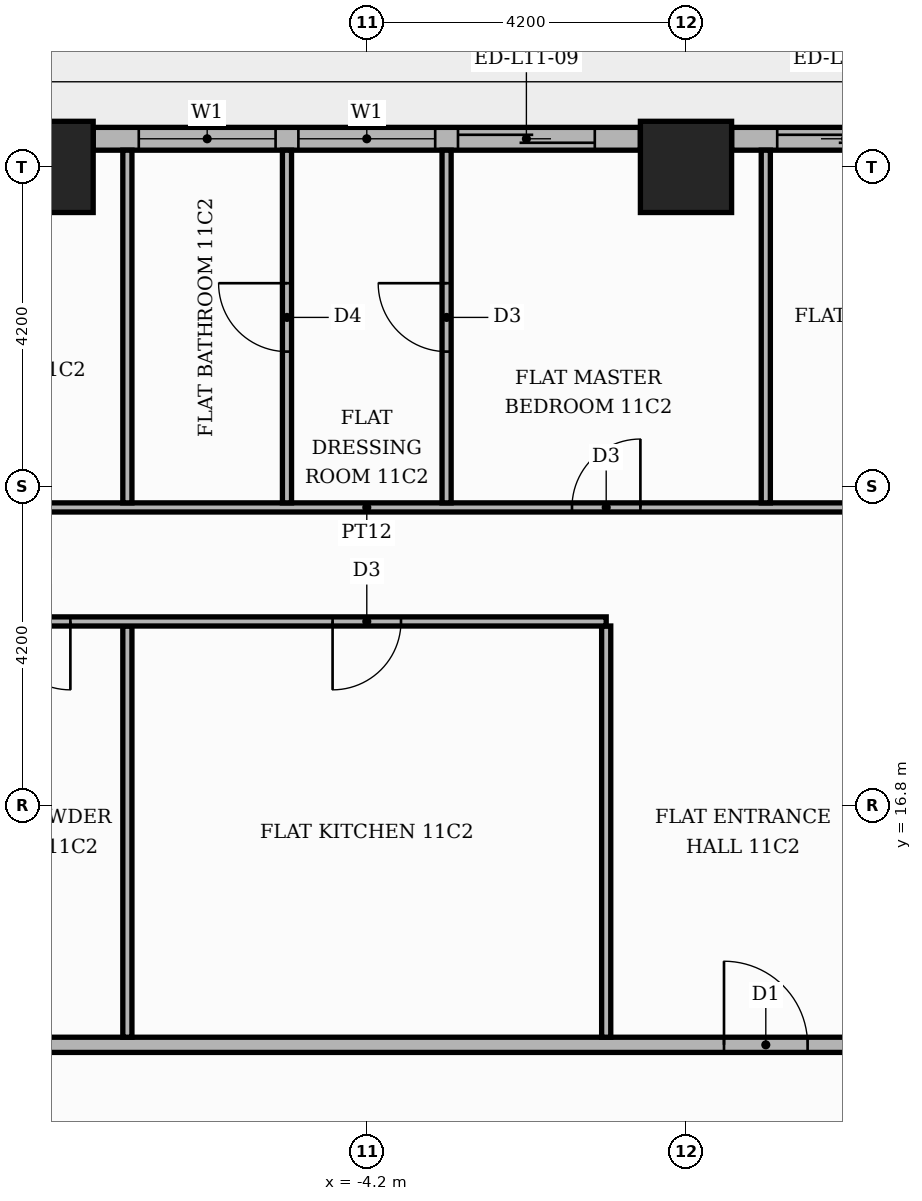
"""IFC4 building model, lengths in metres.
Left out: names, types, materials, properties, quantities, classifications, styles, units other than length and angle.
Written with IfcOpenShell. Run it as: python <this file> out.ifc"""

import sys

from ifc_helpers import new_model, si_unit, direction, frame, frame_2d, origin, origin_2d, place, context, subcontext, project, spatial, rectangle, extrude, element, fill, save


model = new_model("IFC4")
c1 = context("Model", 3, precision=1e-05, world=origin(), true_north=direction((0.0, 1.0)))
c2 = subcontext(c1, "Body", "Model", "MODEL_VIEW")
j1 = project(units=[si_unit("LENGTHUNIT", "METRE"), si_unit("PLANEANGLEUNIT", "RADIAN")], contexts=[c1])
p1 = place(None, origin())
s1 = spatial("IfcSite", under=j1, at=p1, CompositionType="ELEMENT")
p2 = place(p1, origin())
s2 = spatial("IfcBuilding", under=s1, at=p2, CompositionType="ELEMENT")
p3 = place(p2, frame((0.0, 0.0, 50.4)))
s3 = spatial("IfcBuildingStorey", under=s2, at=p3, CompositionType="ELEMENT", Elevation=50.4)
for number, where, z_axis, x_axis in (
    (1, (0.0, 25.2, 0.0), (0.0, 0.0, 1.0), (1.0, 0.0, 0.0)),
    (2, (-8.4, 25.2, 0.0), (0.0, 0.0, 1.0), (1.0, 0.0, 0.0)),
):
    element("IfcColumn", number, at=place(p3, frame(where, z_axis=z_axis, x_axis=x_axis)), inside=s3, PredefinedType="COLUMN", context=c2, shape_type="SweptSolid", body=[
        extrude(rectangle(XDim=1.2, YDim=1.2, at=origin_2d()), origin(), (0.0, 0.0, 1.0), 3.9),
    ])
p4 = place(p3, frame((7.8, 25.57, 0.0), z_axis=(0.0, 0.0, 1.0), x_axis=(-1.0, 0.0, 0.0)))
e3 = element("IfcWall", 3, at=p4, inside=s3, PredefinedType="STANDARD", context=c2, shape_type="SweptSolid", body=[
    extrude(rectangle(XDim=7.2, YDim=0.3, at=frame_2d((3.6, 0.0))), origin(), (0.0, 0.0, 1.0), 3.48),
])
p5 = place(p4, frame((0.6, 0.0, 0.9)))
e4 = element("IfcOpeningElement", 4, at=p5, cuts=e3, PredefinedType="OPENING", context=c2, shape_type="SweptSolid", body=[
    extrude(rectangle(XDim=1.8, YDim=2.1, at=frame_2d((0.9, 1.05))), frame((0.0, 0.16, 0.0), z_axis=(0.0, -1.0, 0.0), x_axis=(1.0, 0.0, 0.0)), (0.0, 0.0, 1.0), 0.32),
])
p6 = place(p4, frame((2.7, 0.0, 0.9)))
e5 = element("IfcOpeningElement", 5, at=p6, cuts=e3, PredefinedType="OPENING", context=c2, shape_type="SweptSolid", body=[
    extrude(rectangle(XDim=1.8, YDim=2.1, at=frame_2d((0.9, 1.05))), frame((0.0, 0.16, 0.0), z_axis=(0.0, -1.0, 0.0), x_axis=(1.0, 0.0, 0.0)), (0.0, 0.0, 1.0), 0.32),
])
p7 = place(p4, frame((4.8, 0.0, 0.0)))
e6 = element("IfcOpeningElement", 6, at=p7, cuts=e3, PredefinedType="OPENING", context=c2, shape_type="SweptSolid", body=[
    extrude(rectangle(XDim=1.8, YDim=2.4, at=frame_2d((0.9, 1.2))), frame((0.0, 0.16, 0.0), z_axis=(0.0, -1.0, 0.0), x_axis=(1.0, 0.0, 0.0)), (0.0, 0.0, 1.0), 0.32),
])
p8 = place(p3, frame((-0.6, 25.57, 0.0), z_axis=(0.0, 0.0, 1.0), x_axis=(-1.0, 0.0, 0.0)))
e7 = element("IfcWall", 7, at=p8, inside=s3, PredefinedType="STANDARD", context=c2, shape_type="SweptSolid", body=[
    extrude(rectangle(XDim=7.2, YDim=0.3, at=frame_2d((3.6, 0.0))), origin(), (0.0, 0.0, 1.0), 3.48),
])
p9 = place(p8, frame((0.6, 0.0, 0.0)))
e8 = element("IfcOpeningElement", 8, at=p9, cuts=e7, PredefinedType="OPENING", context=c2, shape_type="SweptSolid", body=[
    extrude(rectangle(XDim=1.8, YDim=2.4, at=frame_2d((0.9, 1.2))), frame((0.0, 0.16, 0.0), z_axis=(0.0, -1.0, 0.0), x_axis=(1.0, 0.0, 0.0)), (0.0, 0.0, 1.0), 0.32),
])
p10 = place(p8, frame((2.7, 0.0, 0.9)))
e9 = element("IfcOpeningElement", 9, at=p10, cuts=e7, PredefinedType="OPENING", context=c2, shape_type="SweptSolid", body=[
    extrude(rectangle(XDim=1.8, YDim=2.1, at=frame_2d((0.9, 1.05))), frame((0.0, 0.16, 0.0), z_axis=(0.0, -1.0, 0.0), x_axis=(1.0, 0.0, 0.0)), (0.0, 0.0, 1.0), 0.32),
])
p11 = place(p8, frame((4.8, 0.0, 0.9)))
e10 = element("IfcOpeningElement", 10, at=p11, cuts=e7, PredefinedType="OPENING", context=c2, shape_type="SweptSolid", body=[
    extrude(rectangle(XDim=1.8, YDim=2.1, at=frame_2d((0.9, 1.05))), frame((0.0, 0.16, 0.0), z_axis=(0.0, -1.0, 0.0), x_axis=(1.0, 0.0, 0.0)), (0.0, 0.0, 1.0), 0.32),
])
p12 = place(p3, frame((-13.65, 13.65, 0.0), z_axis=(0.0, 0.0, 1.0), x_axis=(1.0, 0.0, 0.0)))
e11 = element("IfcWall", 11, at=p12, inside=s3, PredefinedType="PARTITIONING", context=c2, shape_type="SweptSolid", body=[
    extrude(rectangle(XDim=39.07, YDim=0.2, at=frame_2d((19.535, 0.0))), origin(), (0.0, 0.0, 1.0), 3.48),
])
p13 = place(p12, frame((24.65, 0.0, 0.0)))
e12 = element("IfcOpeningElement", 12, at=p13, cuts=e11, PredefinedType="OPENING", context=c2, shape_type="SweptSolid", body=[
    extrude(rectangle(XDim=1.1, YDim=2.4, at=frame_2d((0.55, 1.2))), frame((0.0, 0.11, 0.0), z_axis=(0.0, -1.0, 0.0), x_axis=(1.0, 0.0, 0.0)), (0.0, 0.0, 1.0), 0.22),
])
p14 = place(p12, frame((14.15, 0.0, 0.0)))
e13 = element("IfcOpeningElement", 13, at=p14, cuts=e11, PredefinedType="OPENING", context=c2, shape_type="SweptSolid", body=[
    extrude(rectangle(XDim=1.1, YDim=2.4, at=frame_2d((0.55, 1.2))), frame((0.0, 0.11, 0.0), z_axis=(0.0, -1.0, 0.0), x_axis=(1.0, 0.0, 0.0)), (0.0, 0.0, 1.0), 0.22),
])
for number, where, z_axis, x_axis in (
    (14, (-7.35, 13.75, 0.0), (0.0, 0.0, 1.0), (0.0, 1.0, 0.0)),
    (15, (-1.05, 13.75, 0.0), (0.0, 0.0, 1.0), (0.0, 1.0, 0.0)),
):
    element("IfcWall", number, at=place(p3, frame(where, z_axis=z_axis, x_axis=x_axis)), inside=s3, PredefinedType="PARTITIONING", context=c2, shape_type="SweptSolid", body=[
        extrude(rectangle(XDim=5.41, YDim=0.12, at=frame_2d((2.705, 0.0))), origin(), (0.0, 0.0, 1.0), 3.48),
    ])
p15 = place(p3, frame((-13.55, 19.22, 0.0), z_axis=(0.0, 0.0, 1.0), x_axis=(1.0, 0.0, 0.0)))
e16 = element("IfcWall", 16, at=p15, inside=s3, PredefinedType="PARTITIONING", context=c2, shape_type="SweptSolid", body=[
    extrude(rectangle(XDim=12.5, YDim=0.12, at=frame_2d((6.25, 0.0))), origin(), (0.0, 0.0, 1.0), 3.48),
])
p16 = place(p15, frame((8.9, 0.0, 0.0)))
e17 = element("IfcOpeningElement", 17, at=p16, cuts=e16, PredefinedType="OPENING", context=c2, shape_type="SweptSolid", body=[
    extrude(rectangle(XDim=0.9, YDim=2.1, at=frame_2d((0.45, 1.05))), frame((0.0, 0.07, 0.0), z_axis=(0.0, -1.0, 0.0), x_axis=(1.0, 0.0, 0.0)), (0.0, 0.0, 1.0), 0.14),
])
p17 = place(p15, frame((4.55, 0.0, 0.0)))
e18 = element("IfcOpeningElement", 18, at=p17, cuts=e16, PredefinedType="OPENING", context=c2, shape_type="SweptSolid", body=[
    extrude(rectangle(XDim=0.9, YDim=2.1, at=frame_2d((0.45, 1.05))), frame((0.0, 0.07, 0.0), z_axis=(0.0, -1.0, 0.0), x_axis=(1.0, 0.0, 0.0)), (0.0, 0.0, 1.0), 0.14),
])
p18 = place(p15, frame((1.4, 0.0, 0.0)))
e19 = element("IfcOpeningElement", 19, at=p18, cuts=e16, PredefinedType="OPENING", context=c2, shape_type="SweptSolid", body=[
    extrude(rectangle(XDim=0.9, YDim=2.1, at=frame_2d((0.45, 1.05))), frame((0.0, 0.07, 0.0), z_axis=(0.0, -1.0, 0.0), x_axis=(1.0, 0.0, 0.0)), (0.0, 0.0, 1.0), 0.14),
])
p19 = place(p3, frame((-13.55, 20.72, 0.0), z_axis=(0.0, 0.0, 1.0), x_axis=(1.0, 0.0, 0.0)))
e20 = element("IfcWall", 20, at=p19, inside=s3, PredefinedType="PARTITIONING", context=c2, shape_type="SweptSolid", body=[
    extrude(rectangle(XDim=18.7, YDim=0.12, at=frame_2d((9.35, 0.0))), origin(), (0.0, 0.0, 1.0), 3.48),
])
p20 = place(p19, frame((16.2, 0.0, 0.0)))
e21 = element("IfcOpeningElement", 21, at=p20, cuts=e20, PredefinedType="OPENING", context=c2, shape_type="SweptSolid", body=[
    extrude(rectangle(XDim=1.0, YDim=2.1, at=frame_2d((0.5, 1.05))), frame((0.0, 0.07, 0.0), z_axis=(0.0, -1.0, 0.0), x_axis=(1.0, 0.0, 0.0)), (0.0, 0.0, 1.0), 0.14),
])
p21 = place(p19, frame((12.05, 0.0, 0.0)))
e22 = element("IfcOpeningElement", 22, at=p21, cuts=e20, PredefinedType="OPENING", context=c2, shape_type="SweptSolid", body=[
    extrude(rectangle(XDim=0.9, YDim=2.1, at=frame_2d((0.45, 1.05))), frame((0.0, 0.07, 0.0), z_axis=(0.0, -1.0, 0.0), x_axis=(1.0, 0.0, 0.0)), (0.0, 0.0, 1.0), 0.14),
])
p22 = place(p19, frame((3.65, 0.0, 0.0)))
e23 = element("IfcOpeningElement", 23, at=p22, cuts=e20, PredefinedType="OPENING", context=c2, shape_type="SweptSolid", body=[
    extrude(rectangle(XDim=0.9, YDim=2.1, at=frame_2d((0.45, 1.05))), frame((0.0, 0.07, 0.0), z_axis=(0.0, -1.0, 0.0), x_axis=(1.0, 0.0, 0.0)), (0.0, 0.0, 1.0), 0.14),
])
p23 = place(p3, frame((-7.35, 20.78, 0.0), z_axis=(0.0, 0.0, 1.0), x_axis=(0.0, 1.0, 0.0)))
e24 = element("IfcWall", 24, at=p23, inside=s3, PredefinedType="PARTITIONING", context=c2, shape_type="SweptSolid", body=[
    extrude(rectangle(XDim=4.64, YDim=0.12, at=frame_2d((2.32, 0.0))), origin(), (0.0, 0.0, 1.0), 3.48),
])
p24 = place(p3, frame((-5.25, 20.78, 0.0), z_axis=(0.0, 0.0, 1.0), x_axis=(0.0, 1.0, 0.0)))
e25 = element("IfcWall", 25, at=p24, inside=s3, PredefinedType="PARTITIONING", context=c2, shape_type="SweptSolid", body=[
    extrude(rectangle(XDim=4.64, YDim=0.12, at=frame_2d((2.32, 0.0))), origin(), (0.0, 0.0, 1.0), 3.48),
])
p25 = place(p24, frame((1.99, 0.0, 0.0)))
e26 = element("IfcOpeningElement", 26, at=p25, cuts=e25, PredefinedType="OPENING", context=c2, shape_type="SweptSolid", body=[
    extrude(rectangle(XDim=0.9, YDim=2.1, at=frame_2d((0.45, 1.05))), frame((0.0, 0.07, 0.0), z_axis=(0.0, -1.0, 0.0), x_axis=(1.0, 0.0, 0.0)), (0.0, 0.0, 1.0), 0.14),
])
p26 = place(p3, frame((-3.15, 20.78, 0.0), z_axis=(0.0, 0.0, 1.0), x_axis=(0.0, 1.0, 0.0)))
e27 = element("IfcWall", 27, at=p26, inside=s3, PredefinedType="PARTITIONING", context=c2, shape_type="SweptSolid", body=[
    extrude(rectangle(XDim=4.64, YDim=0.12, at=frame_2d((2.32, 0.0))), origin(), (0.0, 0.0, 1.0), 3.48),
])
p27 = place(p26, frame((1.99, 0.0, 0.0)))
e28 = element("IfcOpeningElement", 28, at=p27, cuts=e27, PredefinedType="OPENING", context=c2, shape_type="SweptSolid", body=[
    extrude(rectangle(XDim=0.9, YDim=2.1, at=frame_2d((0.45, 1.05))), frame((0.0, 0.07, 0.0), z_axis=(0.0, -1.0, 0.0), x_axis=(1.0, 0.0, 0.0)), (0.0, 0.0, 1.0), 0.14),
])
p28 = place(p3, frame((1.05, 20.78, 0.0), z_axis=(0.0, 0.0, 1.0), x_axis=(0.0, 1.0, 0.0)))
e29 = element("IfcWall", 29, at=p28, inside=s3, PredefinedType="PARTITIONING", context=c2, shape_type="SweptSolid", body=[
    extrude(rectangle(XDim=4.64, YDim=0.12, at=frame_2d((2.32, 0.0))), origin(), (0.0, 0.0, 1.0), 3.48),
])
p29 = place(p7, origin())
e30 = element("IfcDoor", 30, at=p29, inside=s3, OperationType="SLIDING_TO_RIGHT", PredefinedType="DOOR", context=c2, shape_type="SweptSolid", body=[
    extrude(rectangle(XDim=1.8, YDim=2.4, at=frame_2d((0.9, 1.2))), frame((0.0, 0.025, 0.0), z_axis=(0.0, -1.0, 0.0), x_axis=(1.0, 0.0, 0.0)), (0.0, 0.0, 1.0), 0.05),
])
fill(e6, e30)
p30 = place(p9, origin())
e31 = element("IfcDoor", 31, at=p30, inside=s3, OperationType="SLIDING_TO_LEFT", PredefinedType="DOOR", context=c2, shape_type="SweptSolid", body=[
    extrude(rectangle(XDim=1.8, YDim=2.4, at=frame_2d((0.9, 1.2))), frame((0.0, 0.025, 0.0), z_axis=(0.0, -1.0, 0.0), x_axis=(1.0, 0.0, 0.0)), (0.0, 0.0, 1.0), 0.05),
])
fill(e8, e31)
p31 = place(p10, origin())
e32 = element("IfcWindow", 32, at=p31, inside=s3, PartitioningType="SINGLE_PANEL", PredefinedType="WINDOW", context=c2, shape_type="SweptSolid", body=[
    extrude(rectangle(XDim=1.8, YDim=2.1, at=frame_2d((0.9, 1.05))), frame((0.0, 0.03, 0.0), z_axis=(0.0, -1.0, 0.0), x_axis=(1.0, 0.0, 0.0)), (0.0, 0.0, 1.0), 0.06),
])
fill(e9, e32)
p32 = place(p11, origin())
e33 = element("IfcWindow", 33, at=p32, inside=s3, PartitioningType="SINGLE_PANEL", PredefinedType="WINDOW", context=c2, shape_type="SweptSolid", body=[
    extrude(rectangle(XDim=1.8, YDim=2.1, at=frame_2d((0.9, 1.05))), frame((0.0, 0.03, 0.0), z_axis=(0.0, -1.0, 0.0), x_axis=(1.0, 0.0, 0.0)), (0.0, 0.0, 1.0), 0.06),
])
fill(e10, e33)
p33 = place(p14, origin())
e34 = element("IfcDoor", 34, at=p33, inside=s3, OperationType="SINGLE_SWING_LEFT", PredefinedType="DOOR", context=c2, shape_type="SweptSolid", body=[
    extrude(rectangle(XDim=1.1, YDim=2.4, at=frame_2d((0.55, 1.2))), frame((0.0, 0.025, 0.0), z_axis=(0.0, -1.0, 0.0), x_axis=(1.0, 0.0, 0.0)), (0.0, 0.0, 1.0), 0.05),
])
fill(e13, e34)
p34 = place(p16, frame((0.9, 0.0, 0.0), z_axis=(0.0, 0.0, 1.0), x_axis=(-1.0, 0.0, 0.0)))
e35 = element("IfcDoor", 35, at=p34, inside=s3, OperationType="SINGLE_SWING_LEFT", PredefinedType="DOOR", context=c2, shape_type="SweptSolid", body=[
    extrude(rectangle(XDim=0.9, YDim=2.1, at=frame_2d((0.45, 1.05))), frame((0.0, 0.025, 0.0), z_axis=(0.0, -1.0, 0.0), x_axis=(1.0, 0.0, 0.0)), (0.0, 0.0, 1.0), 0.05),
])
fill(e17, e35)
p35 = place(p17, frame((0.9, 0.0, 0.0), z_axis=(0.0, 0.0, 1.0), x_axis=(-1.0, 0.0, 0.0)))
e36 = element("IfcDoor", 36, at=p35, inside=s3, OperationType="SINGLE_SWING_RIGHT", PredefinedType="DOOR", context=c2, shape_type="SweptSolid", body=[
    extrude(rectangle(XDim=0.9, YDim=2.1, at=frame_2d((0.45, 1.05))), frame((0.0, 0.025, 0.0), z_axis=(0.0, -1.0, 0.0), x_axis=(1.0, 0.0, 0.0)), (0.0, 0.0, 1.0), 0.05),
])
fill(e18, e36)
p36 = place(p21, origin())
e37 = element("IfcDoor", 37, at=p36, inside=s3, OperationType="SINGLE_SWING_RIGHT", PredefinedType="DOOR", context=c2, shape_type="SweptSolid", body=[
    extrude(rectangle(XDim=0.9, YDim=2.1, at=frame_2d((0.45, 1.05))), frame((0.0, 0.025, 0.0), z_axis=(0.0, -1.0, 0.0), x_axis=(1.0, 0.0, 0.0)), (0.0, 0.0, 1.0), 0.05),
])
fill(e22, e37)
p37 = place(p27, origin())
e38 = element("IfcDoor", 38, at=p37, inside=s3, OperationType="SINGLE_SWING_RIGHT", PredefinedType="DOOR", context=c2, shape_type="SweptSolid", body=[
    extrude(rectangle(XDim=0.9, YDim=2.1, at=frame_2d((0.45, 1.05))), frame((0.0, 0.025, 0.0), z_axis=(0.0, -1.0, 0.0), x_axis=(1.0, 0.0, 0.0)), (0.0, 0.0, 1.0), 0.05),
])
fill(e28, e38)
p38 = place(p25, origin())
e39 = element("IfcDoor", 39, at=p38, inside=s3, OperationType="SINGLE_SWING_RIGHT", PredefinedType="DOOR", context=c2, shape_type="SweptSolid", body=[
    extrude(rectangle(XDim=0.9, YDim=2.1, at=frame_2d((0.45, 1.05))), frame((0.0, 0.025, 0.0), z_axis=(0.0, -1.0, 0.0), x_axis=(1.0, 0.0, 0.0)), (0.0, 0.0, 1.0), 0.05),
])
fill(e26, e39)
save(model, sys.argv[1])
